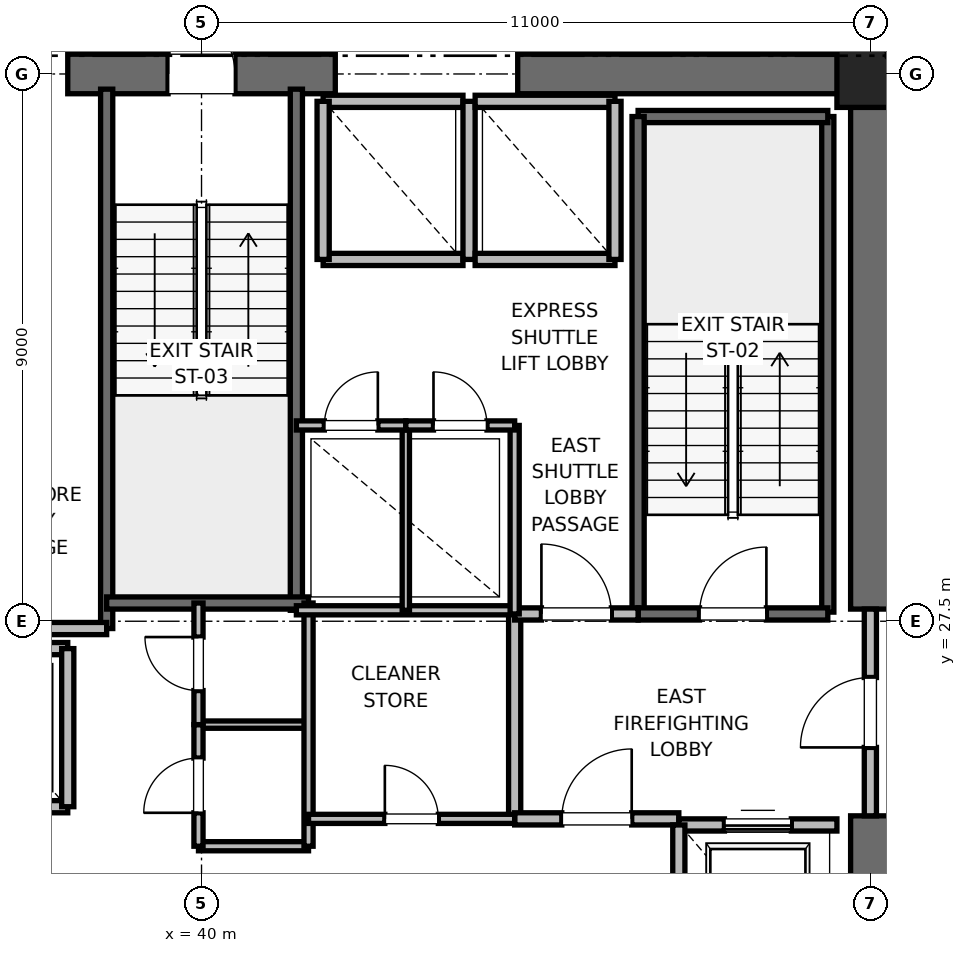
"""IFC4 building model, lengths in metres.
Left out: names, types, materials, properties, quantities, classifications, styles, units other than length and angle.
Written with IfcOpenShell. Run it as: python <this file> out.ifc"""

import sys

from ifc_helpers import new_model, si_unit, direction, frame, frame_2d, origin, origin_2d, place, context, subcontext, project, spatial, rectangle, extrude, element, fill, save


model = new_model("IFC4")
c1 = context("Model", 3, precision=1e-05, world=origin(), true_north=direction((0.0, 1.0)))
c2 = subcontext(c1, "Body", "Model", "MODEL_VIEW")
j1 = project(units=[si_unit("LENGTHUNIT", "METRE"), si_unit("PLANEANGLEUNIT", "RADIAN")], contexts=[c1])
p1 = place(None, origin())
s1 = spatial("IfcSite", under=j1, at=p1, CompositionType="ELEMENT")
p2 = place(p1, origin())
s2 = spatial("IfcBuilding", under=s1, at=p2, CompositionType="ELEMENT")
p3 = place(p2, frame((0.0, 0.0, 95.6)))
s3 = spatial("IfcBuildingStorey", under=s2, at=p3, CompositionType="ELEMENT", Elevation=95.6)
p4 = place(p3, frame((51.0, 36.5, 0.0), z_axis=(0.0, 0.0, 1.0), x_axis=(1.0, 0.0, 0.0)))
e1 = element("IfcColumn", 1, at=p4, inside=s3, PredefinedType="PILASTER", context=c2, shape_type="SweptSolid", body=[
    extrude(rectangle(XDim=1.1, YDim=1.1, at=origin_2d()), origin(), (0.0, 0.0, 1.0), 4.0),
])
p5 = place(p3, frame((37.8, 36.5, 0.0), z_axis=(0.0, 0.0, 1.0), x_axis=(1.0, 0.0, 0.0)))
e2 = element("IfcWall", 2, at=p5, inside=s3, PredefinedType="SHEAR", context=c2, shape_type="SweptSolid", body=[
    extrude(rectangle(XDim=4.4, YDim=0.65, at=frame_2d((2.2, 0.0))), origin(), (0.0, 0.0, 1.0), 3.76),
])
p6 = place(p5, frame((1.65, 0.0, 0.0)))
e3 = element("IfcOpeningElement", 3, at=p6, cuts=e2, PredefinedType="OPENING", context=c2, shape_type="SweptSolid", body=[
    extrude(rectangle(XDim=1.1, YDim=2.15, at=frame_2d((0.55, 1.075))), frame((0.0, 0.325, 0.0), z_axis=(0.0, -1.0, 0.0), x_axis=(1.0, 0.0, 0.0)), (0.0, 0.0, 1.0), 0.65),
])
for number, where, z_axis, x_axis in (
    (4, (45.2, 36.5, 0.0), (0.0, 0.0, 1.0), (1.0, 0.0, 0.0)),
    (5, (51.0, 18.5, 0.0), (0.0, 0.0, 1.0), (0.0, 1.0, 0.0)),
):
    element("IfcWall", number, at=place(p3, frame(where, z_axis=z_axis, x_axis=x_axis)), inside=s3, PredefinedType="SHEAR", context=c2, shape_type="SweptSolid", body=[
        extrude(rectangle(XDim=5.8, YDim=0.65, at=frame_2d((2.9, 0.0))), origin(), (0.0, 0.0, 1.0), 3.76),
    ])
p7 = place(p3, frame((51.0, 27.7, 0.0), z_axis=(0.0, 0.0, 1.0), x_axis=(0.0, 1.0, 0.0)))
e6 = element("IfcWall", 6, at=p7, inside=s3, PredefinedType="SHEAR", context=c2, shape_type="SweptSolid", body=[
    extrude(rectangle(XDim=8.8, YDim=0.65, at=frame_2d((4.4, 0.0))), origin(), (0.0, 0.0, 1.0), 3.76),
])
p8 = place(p3, frame((50.3, 27.65, 0.0), z_axis=(0.0, 0.0, 1.0), x_axis=(0.0, 1.0, 0.0)))
e7 = element("IfcWall", 7, at=p8, inside=s3, PredefinedType="SOLIDWALL", context=c2, shape_type="SweptSolid", body=[
    extrude(rectangle(XDim=8.15, YDim=0.2, at=frame_2d((4.075, 0.0))), origin(), (0.0, 0.0, 1.0), 3.76),
])
p9 = place(p3, frame((47.18, 35.8, 0.0), z_axis=(0.0, 0.0, 1.0), x_axis=(1.0, 0.0, 0.0)))
e8 = element("IfcWall", 8, at=p9, inside=s3, PredefinedType="SOLIDWALL", context=c2, shape_type="SweptSolid", body=[
    extrude(rectangle(XDim=3.12, YDim=0.2, at=frame_2d((1.56, 0.0))), origin(), (0.0, 0.0, 1.0), 3.76),
])
p10 = place(p3, frame((47.18, 27.62, 0.0), z_axis=(0.0, 0.0, 1.0), x_axis=(0.0, 1.0, 0.0)))
e9 = element("IfcWall", 9, at=p10, inside=s3, PredefinedType="SOLIDWALL", context=c2, shape_type="SweptSolid", body=[
    extrude(rectangle(XDim=8.18, YDim=0.2, at=frame_2d((4.09, 0.0))), origin(), (0.0, 0.0, 1.0), 3.76),
])
p11 = place(p3, frame((47.18, 27.62, 0.0), z_axis=(0.0, 0.0, 1.0), x_axis=(1.0, 0.0, 0.0)))
e10 = element("IfcWall", 10, at=p11, inside=s3, PredefinedType="SOLIDWALL", context=c2, shape_type="SweptSolid", body=[
    extrude(rectangle(XDim=3.12, YDim=0.2, at=frame_2d((1.56, 0.0))), origin(), (0.0, 0.0, 1.0), 3.76),
])
p12 = place(p11, frame((1.01, 0.0, 0.0)))
e11 = element("IfcOpeningElement", 11, at=p12, cuts=e10, PredefinedType="OPENING", context=c2, shape_type="SweptSolid", body=[
    extrude(rectangle(XDim=1.1, YDim=2.15, at=frame_2d((0.55, 1.075))), frame((0.0, 0.1, 0.0), z_axis=(0.0, -1.0, 0.0), x_axis=(1.0, 0.0, 0.0)), (0.0, 0.0, 1.0), 0.2),
])
p13 = place(p3, frame((38.44, 27.38, 0.0), z_axis=(0.0, 0.0, 1.0), x_axis=(0.0, 1.0, 0.0)))
e12 = element("IfcWall", 12, at=p13, inside=s3, PredefinedType="SOLIDWALL", context=c2, shape_type="SweptSolid", body=[
    extrude(rectangle(XDim=8.87, YDim=0.2, at=frame_2d((4.435, 0.0))), origin(), (0.0, 0.0, 1.0), 3.76),
])
p14 = place(p3, frame((41.56, 27.68, 0.0), z_axis=(0.0, 0.0, 1.0), x_axis=(0.0, 1.0, 0.0)))
e13 = element("IfcWall", 13, at=p14, inside=s3, PredefinedType="SOLIDWALL", context=c2, shape_type="SweptSolid", body=[
    extrude(rectangle(XDim=8.57, YDim=0.2, at=frame_2d((4.285, 0.0))), origin(), (0.0, 0.0, 1.0), 3.76),
])
p15 = place(p3, frame((38.44, 27.8, 0.0), z_axis=(0.0, 0.0, 1.0), x_axis=(1.0, 0.0, 0.0)))
e14 = element("IfcWall", 14, at=p15, inside=s3, PredefinedType="SOLIDWALL", context=c2, shape_type="SweptSolid", body=[
    extrude(rectangle(XDim=3.32, YDim=0.2, at=frame_2d((1.66, 0.0))), origin(), (0.0, 0.0, 1.0), 3.76),
])
p16 = place(p3, frame((32.82, 27.38, 0.0), z_axis=(0.0, 0.0, 1.0), x_axis=(1.0, 0.0, 0.0)))
e15 = element("IfcWall", 15, at=p16, inside=s3, PredefinedType="PARTITIONING", context=c2, shape_type="SweptSolid", body=[
    extrude(rectangle(XDim=5.62, YDim=0.2, at=frame_2d((2.81, 0.0))), origin(), (0.0, 0.0, 1.0), 3.76),
])
p17 = place(p3, frame((45.15, 24.25, 0.0), z_axis=(0.0, 0.0, 1.0), x_axis=(0.0, 1.0, 0.0)))
e16 = element("IfcWall", 16, at=p17, inside=s3, PredefinedType="PARTITIONING", context=c2, shape_type="SweptSolid", body=[
    extrude(rectangle(XDim=3.37, YDim=0.2, at=frame_2d((1.685, 0.0))), origin(), (0.0, 0.0, 1.0), 3.76),
])
p18 = place(p3, frame((45.15, 24.25, 0.0), z_axis=(0.0, 0.0, 1.0), x_axis=(1.0, 0.0, 0.0)))
e17 = element("IfcWall", 17, at=p18, inside=s3, PredefinedType="PARTITIONING", context=c2, shape_type="SweptSolid", body=[
    extrude(rectangle(XDim=2.7, YDim=0.2, at=frame_2d((1.35, 0.0))), origin(), (0.0, 0.0, 1.0), 3.76),
])
p19 = place(p18, frame((0.775, 0.0, 0.0)))
e18 = element("IfcOpeningElement", 18, at=p19, cuts=e17, PredefinedType="OPENING", context=c2, shape_type="SweptSolid", body=[
    extrude(rectangle(XDim=1.15, YDim=2.2, at=frame_2d((0.575, 1.1))), frame((0.0, 0.1, 0.0), z_axis=(0.0, -1.0, 0.0), x_axis=(1.0, 0.0, 0.0)), (0.0, 0.0, 1.0), 0.2),
])
p20 = place(p3, frame((45.15, 27.62, 0.0), z_axis=(0.0, 0.0, 1.0), x_axis=(1.0, 0.0, 0.0)))
e19 = element("IfcWall", 19, at=p20, inside=s3, PredefinedType="PARTITIONING", context=c2, shape_type="SweptSolid", body=[
    extrude(rectangle(XDim=2.03, YDim=0.2, at=frame_2d((1.015, 0.0))), origin(), (0.0, 0.0, 1.0), 3.76),
])
p21 = place(p20, frame((0.44, 0.0, 0.0)))
e20 = element("IfcOpeningElement", 20, at=p21, cuts=e19, PredefinedType="OPENING", context=c2, shape_type="SweptSolid", body=[
    extrude(rectangle(XDim=1.15, YDim=2.2, at=frame_2d((0.575, 1.1))), frame((0.0, 0.1, 0.0), z_axis=(0.0, -1.0, 0.0), x_axis=(1.0, 0.0, 0.0)), (0.0, 0.0, 1.0), 0.2),
])
p22 = place(p3, frame((51.0, 24.3, 0.0), z_axis=(0.0, 0.0, 1.0), x_axis=(0.0, 1.0, 0.0)))
e21 = element("IfcWall", 21, at=p22, inside=s3, PredefinedType="PARTITIONING", context=c2, shape_type="SweptSolid", body=[
    extrude(rectangle(XDim=3.4, YDim=0.2, at=frame_2d((1.7, 0.0))), origin(), (0.0, 0.0, 1.0), 2.54),
])
p23 = place(p22, frame((1.125, 0.0, 0.0)))
e22 = element("IfcOpeningElement", 22, at=p23, cuts=e21, PredefinedType="OPENING", context=c2, shape_type="SweptSolid", body=[
    extrude(rectangle(XDim=1.15, YDim=2.2, at=frame_2d((0.575, 1.1))), frame((0.0, 0.1, 0.0), z_axis=(0.0, -1.0, 0.0), x_axis=(1.0, 0.0, 0.0)), (0.0, 0.0, 1.0), 0.2),
])
p24 = place(p3, frame((50.45, 24.15, 0.0), z_axis=(0.0, 0.0, 1.0), x_axis=(-1.0, 0.0, 0.0)))
e23 = element("IfcWall", 23, at=p24, inside=s3, PredefinedType="SOLIDWALL", context=c2, shape_type="SweptSolid", body=[
    extrude(rectangle(XDim=2.6, YDim=0.2, at=frame_2d((1.3, 0.0))), origin(), (0.0, 0.0, 1.0), 2.54),
])
p25 = place(p24, frame((0.75, 0.0, 0.0)))
e24 = element("IfcOpeningElement", 24, at=p25, cuts=e23, PredefinedType="OPENING", context=c2, shape_type="SweptSolid", body=[
    extrude(rectangle(XDim=1.1, YDim=2.2, at=frame_2d((0.55, 1.1))), frame((0.0, 0.1, 0.0), z_axis=(0.0, -1.0, 0.0), x_axis=(1.0, 0.0, 0.0)), (0.0, 0.0, 1.0), 0.2),
])
p26 = place(p3, frame((47.85, 24.15, 0.0), z_axis=(0.0, 0.0, 1.0), x_axis=(0.0, -1.0, 0.0)))
e25 = element("IfcWall", 25, at=p26, inside=s3, PredefinedType="SOLIDWALL", context=c2, shape_type="SweptSolid", body=[
    extrude(rectangle(XDim=3.0, YDim=0.2, at=frame_2d((1.5, 0.0))), origin(), (0.0, 0.0, 1.0), 3.76),
])
p27 = place(p3, frame((35.5, 24.45, 0.0), z_axis=(0.0, 0.0, 1.0), x_axis=(1.0, 0.0, 0.0)))
e26 = element("IfcWall", 26, at=p27, inside=s3, PredefinedType="SOLIDWALL", context=c2, shape_type="SweptSolid", body=[
    extrude(rectangle(XDim=2.3, YDim=0.2, at=frame_2d((1.15, 0.0))), origin(), (0.0, 0.0, 1.0), 3.76),
])
p28 = place(p27, frame((0.6, 0.0, 0.0)))
e27 = element("IfcOpeningElement", 27, at=p28, cuts=e26, PredefinedType="OPENING", context=c2, shape_type="SweptSolid", body=[
    extrude(rectangle(XDim=1.1, YDim=2.2, at=frame_2d((0.55, 1.1))), frame((0.0, 0.1, 0.0), z_axis=(0.0, -1.0, 0.0), x_axis=(1.0, 0.0, 0.0)), (0.0, 0.0, 1.0), 0.2),
])
p29 = place(p3, frame((37.8, 27.05, 0.0), z_axis=(0.0, 0.0, 1.0), x_axis=(-1.0, 0.0, 0.0)))
e28 = element("IfcWall", 28, at=p29, inside=s3, PredefinedType="SOLIDWALL", context=c2, shape_type="SweptSolid", body=[
    extrude(rectangle(XDim=2.3, YDim=0.2, at=frame_2d((1.15, 0.0))), origin(), (0.0, 0.0, 1.0), 3.76),
])
p30 = place(p3, frame((37.8, 24.45, 0.0), z_axis=(0.0, 0.0, 1.0), x_axis=(0.0, 1.0, 0.0)))
e29 = element("IfcWall", 29, at=p30, inside=s3, PredefinedType="SOLIDWALL", context=c2, shape_type="SweptSolid", body=[
    extrude(rectangle(XDim=2.6, YDim=0.2, at=frame_2d((1.3, 0.0))), origin(), (0.0, 0.0, 1.0), 3.76),
])
p31 = place(p3, frame((42.0, 33.45, 0.0), z_axis=(0.0, 0.0, 1.0), x_axis=(1.0, 0.0, 0.0)))
e30 = element("IfcWall", 30, at=p31, inside=s3, PredefinedType="SOLIDWALL", context=c2, shape_type="SweptSolid", body=[
    extrude(rectangle(XDim=2.3, YDim=0.2, at=frame_2d((1.15, 0.0))), origin(), (0.0, 0.0, 1.0), 3.76),
])
p32 = place(p3, frame((44.3, 36.05, 0.0), z_axis=(0.0, 0.0, 1.0), x_axis=(-1.0, 0.0, 0.0)))
e31 = element("IfcWall", 31, at=p32, inside=s3, PredefinedType="SOLIDWALL", context=c2, shape_type="SweptSolid", body=[
    extrude(rectangle(XDim=2.3, YDim=0.2, at=frame_2d((1.15, 0.0))), origin(), (0.0, 0.0, 1.0), 2.54),
])
for number, where, z_axis, x_axis in (
    (32, (42.0, 36.05, 0.0), (0.0, 0.0, 1.0), (0.0, -1.0, 0.0)),
    (33, (44.4, 33.45, 0.0), (0.0, 0.0, 1.0), (0.0, 1.0, 0.0)),
):
    element("IfcWall", number, at=place(p3, frame(where, z_axis=z_axis, x_axis=x_axis)), inside=s3, PredefinedType="SOLIDWALL", context=c2, shape_type="SweptSolid", body=[
        extrude(rectangle(XDim=2.6, YDim=0.2, at=frame_2d((1.3, 0.0))), origin(), (0.0, 0.0, 1.0), 2.54),
    ])
p33 = place(p3, frame((44.5, 33.45, 0.0), z_axis=(0.0, 0.0, 1.0), x_axis=(1.0, 0.0, 0.0)))
e34 = element("IfcWall", 34, at=p33, inside=s3, PredefinedType="SOLIDWALL", context=c2, shape_type="SweptSolid", body=[
    extrude(rectangle(XDim=2.3, YDim=0.2, at=frame_2d((1.15, 0.0))), origin(), (0.0, 0.0, 1.0), 3.76),
])
p34 = place(p3, frame((46.8, 36.05, 0.0), z_axis=(0.0, 0.0, 1.0), x_axis=(-1.0, 0.0, 0.0)))
e35 = element("IfcWall", 35, at=p34, inside=s3, PredefinedType="SOLIDWALL", context=c2, shape_type="SweptSolid", body=[
    extrude(rectangle(XDim=2.3, YDim=0.2, at=frame_2d((1.15, 0.0))), origin(), (0.0, 0.0, 1.0), 2.54),
])
p35 = place(p3, frame((46.8, 33.45, 0.0), z_axis=(0.0, 0.0, 1.0), x_axis=(0.0, 1.0, 0.0)))
e36 = element("IfcWall", 36, at=p35, inside=s3, PredefinedType="SOLIDWALL", context=c2, shape_type="SweptSolid", body=[
    extrude(rectangle(XDim=2.6, YDim=0.2, at=frame_2d((1.3, 0.0))), origin(), (0.0, 0.0, 1.0), 3.76),
])
p36 = place(p3, frame((39.95, 23.8, 0.0), z_axis=(0.0, 0.0, 1.0), x_axis=(1.0, 0.0, 0.0)))
e37 = element("IfcWall", 37, at=p36, inside=s3, PredefinedType="PARTITIONING", context=c2, shape_type="SweptSolid", body=[
    extrude(rectangle(XDim=1.81, YDim=0.15, at=frame_2d((0.905, 0.0))), origin(), (0.0, 0.0, 1.0), 2.85),
])
p37 = place(p3, frame((39.95, 25.8, 0.0), z_axis=(0.0, 0.0, 1.0), x_axis=(1.0, 0.0, 0.0)))
e38 = element("IfcWall", 38, at=p37, inside=s3, PredefinedType="PARTITIONING", context=c2, shape_type="SweptSolid", body=[
    extrude(rectangle(XDim=1.81, YDim=0.12, at=frame_2d((0.905, 0.0))), origin(), (0.0, 0.0, 1.0), 2.85),
])
p38 = place(p3, frame((41.76, 23.8, 0.0), z_axis=(0.0, 0.0, 1.0), x_axis=(0.0, 1.0, 0.0)))
e39 = element("IfcWall", 39, at=p38, inside=s3, PredefinedType="PARTITIONING", context=c2, shape_type="SweptSolid", body=[
    extrude(rectangle(XDim=4.0, YDim=0.15, at=frame_2d((2.0, 0.0))), origin(), (0.0, 0.0, 1.0), 2.85),
])
p39 = place(p3, frame((39.95, 23.8, 0.0), z_axis=(0.0, 0.0, 1.0), x_axis=(0.0, 1.0, 0.0)))
e40 = element("IfcWall", 40, at=p39, inside=s3, PredefinedType="PARTITIONING", context=c2, shape_type="SweptSolid", body=[
    extrude(rectangle(XDim=2.0, YDim=0.15, at=frame_2d((1.0, 0.0))), origin(), (0.0, 0.0, 1.0), 2.85),
])
p40 = place(p39, frame((0.55, 0.0, 0.0)))
e41 = element("IfcOpeningElement", 41, at=p40, cuts=e40, PredefinedType="OPENING", context=c2, shape_type="SweptSolid", body=[
    extrude(rectangle(XDim=0.9, YDim=2.1, at=frame_2d((0.45, 1.05))), frame((0.0, 0.075, 0.0), z_axis=(0.0, -1.0, 0.0), x_axis=(1.0, 0.0, 0.0)), (0.0, 0.0, 1.0), 0.15),
])
p41 = place(p3, frame((39.95, 25.8, 0.0), z_axis=(0.0, 0.0, 1.0), x_axis=(0.0, 1.0, 0.0)))
e42 = element("IfcWall", 42, at=p41, inside=s3, PredefinedType="PARTITIONING", context=c2, shape_type="SweptSolid", body=[
    extrude(rectangle(XDim=2.0, YDim=0.15, at=frame_2d((1.0, 0.0))), origin(), (0.0, 0.0, 1.0), 2.85),
])
p42 = place(p41, frame((0.56, 0.0, 0.0)))
e43 = element("IfcOpeningElement", 43, at=p42, cuts=e42, PredefinedType="OPENING", context=c2, shape_type="SweptSolid", body=[
    extrude(rectangle(XDim=0.88, YDim=2.1, at=frame_2d((0.44, 1.05))), frame((0.0, 0.075, 0.0), z_axis=(0.0, -1.0, 0.0), x_axis=(1.0, 0.0, 0.0)), (0.0, 0.0, 1.0), 0.15),
])
p43 = place(p3, frame((41.56, 27.68, 0.0), z_axis=(0.0, 0.0, 1.0), x_axis=(1.0, 0.0, 0.0)))
e44 = element("IfcWall", 44, at=p43, inside=s3, PredefinedType="PARTITIONING", context=c2, shape_type="SweptSolid", body=[
    extrude(rectangle(XDim=3.59, YDim=0.15, at=frame_2d((1.795, 0.0))), origin(), (0.0, 0.0, 1.0), 2.85),
])
p44 = place(p3, frame((41.76, 24.25, 0.0), z_axis=(0.0, 0.0, 1.0), x_axis=(1.0, 0.0, 0.0)))
e45 = element("IfcWall", 45, at=p44, inside=s3, PredefinedType="PARTITIONING", context=c2, shape_type="SweptSolid", body=[
    extrude(rectangle(XDim=3.39, YDim=0.15, at=frame_2d((1.695, 0.0))), origin(), (0.0, 0.0, 1.0), 2.85),
])
p45 = place(p44, frame((1.255, 0.0, 0.0)))
e46 = element("IfcOpeningElement", 46, at=p45, cuts=e45, PredefinedType="OPENING", context=c2, shape_type="SweptSolid", body=[
    extrude(rectangle(XDim=0.88, YDim=2.1, at=frame_2d((0.44, 1.05))), frame((0.0, 0.075, 0.0), z_axis=(0.0, -1.0, 0.0), x_axis=(1.0, 0.0, 0.0)), (0.0, 0.0, 1.0), 0.15),
])
p46 = place(p3, frame((45.15, 27.62, 0.0), z_axis=(0.0, 0.0, 1.0), x_axis=(0.0, 1.0, 0.0)))
e47 = element("IfcWall", 47, at=p46, inside=s3, PredefinedType="PARTITIONING", context=c2, shape_type="SweptSolid", body=[
    extrude(rectangle(XDim=3.1, YDim=0.15, at=frame_2d((1.55, 0.0))), origin(), (0.0, 0.0, 1.0), 2.85),
])
p47 = place(p3, frame((43.36, 27.68, 0.0), z_axis=(0.0, 0.0, 1.0), x_axis=(0.0, 1.0, 0.0)))
e48 = element("IfcWall", 48, at=p47, inside=s3, PredefinedType="PARTITIONING", context=c2, shape_type="SweptSolid", body=[
    extrude(rectangle(XDim=3.04, YDim=0.12, at=frame_2d((1.52, 0.0))), origin(), (0.0, 0.0, 1.0), 2.85),
])
p48 = place(p3, frame((41.56, 30.72, 0.0), z_axis=(0.0, 0.0, 1.0), x_axis=(1.0, 0.0, 0.0)))
e49 = element("IfcWall", 49, at=p48, inside=s3, PredefinedType="PARTITIONING", context=c2, shape_type="SweptSolid", body=[
    extrude(rectangle(XDim=1.8, YDim=0.15, at=frame_2d((0.9, 0.0))), origin(), (0.0, 0.0, 1.0), 2.85),
])
p49 = place(p48, frame((0.46, 0.0, 0.0)))
e50 = element("IfcOpeningElement", 50, at=p49, cuts=e49, PredefinedType="OPENING", context=c2, shape_type="SweptSolid", body=[
    extrude(rectangle(XDim=0.88, YDim=2.1, at=frame_2d((0.44, 1.05))), frame((0.0, 0.075, 0.0), z_axis=(0.0, -1.0, 0.0), x_axis=(1.0, 0.0, 0.0)), (0.0, 0.0, 1.0), 0.15),
])
p50 = place(p3, frame((43.36, 30.72, 0.0), z_axis=(0.0, 0.0, 1.0), x_axis=(1.0, 0.0, 0.0)))
e51 = element("IfcWall", 51, at=p50, inside=s3, PredefinedType="PARTITIONING", context=c2, shape_type="SweptSolid", body=[
    extrude(rectangle(XDim=1.79, YDim=0.15, at=frame_2d((0.895, 0.0))), origin(), (0.0, 0.0, 1.0), 2.85),
])
p51 = place(p50, frame((0.455, 0.0, 0.0)))
e52 = element("IfcOpeningElement", 52, at=p51, cuts=e51, PredefinedType="OPENING", context=c2, shape_type="SweptSolid", body=[
    extrude(rectangle(XDim=0.88, YDim=2.1, at=frame_2d((0.44, 1.05))), frame((0.0, 0.075, 0.0), z_axis=(0.0, -1.0, 0.0), x_axis=(1.0, 0.0, 0.0)), (0.0, 0.0, 1.0), 0.15),
])
p52 = place(p12, origin())
e53 = element("IfcDoor", 53, at=p52, inside=s3, OperationType="SINGLE_SWING_RIGHT", PredefinedType="DOOR", context=c2, shape_type="SweptSolid", body=[
    extrude(rectangle(XDim=1.1, YDim=2.15, at=frame_2d((0.55, 1.075))), frame((0.0, 0.025, 0.0), z_axis=(0.0, -1.0, 0.0), x_axis=(1.0, 0.0, 0.0)), (0.0, 0.0, 1.0), 0.05),
])
fill(e11, e53)
p53 = place(p6, origin())
e54 = element("IfcDoor", 54, at=p53, inside=s3, OperationType="SINGLE_SWING_LEFT", PredefinedType="DOOR", context=c2, shape_type="SweptSolid", body=[
    extrude(rectangle(XDim=1.1, YDim=2.15, at=frame_2d((0.55, 1.075))), frame((0.0, 0.025, 0.0), z_axis=(0.0, -1.0, 0.0), x_axis=(1.0, 0.0, 0.0)), (0.0, 0.0, 1.0), 0.05),
])
fill(e3, e54)
p54 = place(p19, origin())
e55 = element("IfcDoor", 55, at=p54, inside=s3, OperationType="SINGLE_SWING_RIGHT", PredefinedType="DOOR", context=c2, shape_type="SweptSolid", body=[
    extrude(rectangle(XDim=1.15, YDim=2.2, at=frame_2d((0.575, 1.1))), frame((0.0, 0.025, 0.0), z_axis=(0.0, -1.0, 0.0), x_axis=(1.0, 0.0, 0.0)), (0.0, 0.0, 1.0), 0.05),
])
fill(e18, e55)
p55 = place(p21, origin())
e56 = element("IfcDoor", 56, at=p55, inside=s3, OperationType="SINGLE_SWING_LEFT", PredefinedType="DOOR", context=c2, shape_type="SweptSolid", body=[
    extrude(rectangle(XDim=1.15, YDim=2.2, at=frame_2d((0.575, 1.1))), frame((0.0, 0.025, 0.0), z_axis=(0.0, -1.0, 0.0), x_axis=(1.0, 0.0, 0.0)), (0.0, 0.0, 1.0), 0.05),
])
fill(e20, e56)
p56 = place(p23, origin())
e57 = element("IfcDoor", 57, at=p56, inside=s3, OperationType="SINGLE_SWING_LEFT", PredefinedType="DOOR", context=c2, shape_type="SweptSolid", body=[
    extrude(rectangle(XDim=1.15, YDim=2.2, at=frame_2d((0.575, 1.1))), frame((0.0, 0.025, 0.0), z_axis=(0.0, -1.0, 0.0), x_axis=(1.0, 0.0, 0.0)), (0.0, 0.0, 1.0), 0.05),
])
fill(e22, e57)
p57 = place(p25, origin())
e58 = element("IfcDoor", 58, at=p57, inside=s3, OperationType="SLIDING_TO_RIGHT", PredefinedType="DOOR", context=c2, shape_type="SweptSolid", body=[
    extrude(rectangle(XDim=1.1, YDim=2.2, at=frame_2d((0.55, 1.1))), frame((0.0, 0.025, 0.0), z_axis=(0.0, -1.0, 0.0), x_axis=(1.0, 0.0, 0.0)), (0.0, 0.0, 1.0), 0.05),
])
fill(e24, e58)
p58 = place(p40, origin())
e59 = element("IfcDoor", 59, at=p58, inside=s3, OperationType="SINGLE_SWING_LEFT", PredefinedType="DOOR", context=c2, shape_type="SweptSolid", body=[
    extrude(rectangle(XDim=0.9, YDim=2.1, at=frame_2d((0.45, 1.05))), frame((0.0, 0.025, 0.0), z_axis=(0.0, -1.0, 0.0), x_axis=(1.0, 0.0, 0.0)), (0.0, 0.0, 1.0), 0.05),
])
fill(e41, e59)
p59 = place(p42, origin())
e60 = element("IfcDoor", 60, at=p59, inside=s3, OperationType="SINGLE_SWING_RIGHT", PredefinedType="DOOR", context=c2, shape_type="SweptSolid", body=[
    extrude(rectangle(XDim=0.88, YDim=2.1, at=frame_2d((0.44, 1.05))), frame((0.0, 0.025, 0.0), z_axis=(0.0, -1.0, 0.0), x_axis=(1.0, 0.0, 0.0)), (0.0, 0.0, 1.0), 0.05),
])
fill(e43, e60)
p60 = place(p45, origin())
e61 = element("IfcDoor", 61, at=p60, inside=s3, OperationType="SINGLE_SWING_LEFT", PredefinedType="DOOR", context=c2, shape_type="SweptSolid", body=[
    extrude(rectangle(XDim=0.88, YDim=2.1, at=frame_2d((0.44, 1.05))), frame((0.0, 0.025, 0.0), z_axis=(0.0, -1.0, 0.0), x_axis=(1.0, 0.0, 0.0)), (0.0, 0.0, 1.0), 0.05),
])
fill(e46, e61)
p61 = place(p49, origin())
e62 = element("IfcDoor", 62, at=p61, inside=s3, OperationType="SINGLE_SWING_RIGHT", PredefinedType="DOOR", context=c2, shape_type="SweptSolid", body=[
    extrude(rectangle(XDim=0.88, YDim=2.1, at=frame_2d((0.44, 1.05))), frame((0.0, 0.025, 0.0), z_axis=(0.0, -1.0, 0.0), x_axis=(1.0, 0.0, 0.0)), (0.0, 0.0, 1.0), 0.05),
])
fill(e50, e62)
p62 = place(p51, origin())
e63 = element("IfcDoor", 63, at=p62, inside=s3, OperationType="SINGLE_SWING_LEFT", PredefinedType="DOOR", context=c2, shape_type="SweptSolid", body=[
    extrude(rectangle(XDim=0.88, YDim=2.1, at=frame_2d((0.44, 1.05))), frame((0.0, 0.025, 0.0), z_axis=(0.0, -1.0, 0.0), x_axis=(1.0, 0.0, 0.0)), (0.0, 0.0, 1.0), 0.05),
])
fill(e52, e63)
save(model, sys.argv[1])
